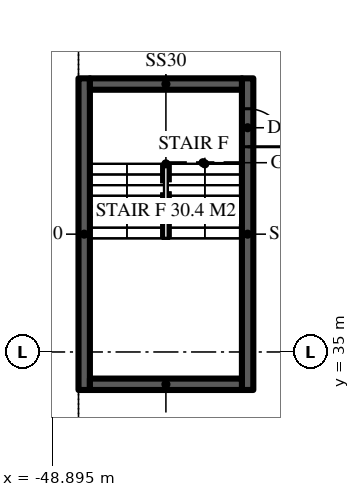
"""IFC4 building model, lengths in metres.
Left out: names, types, materials, properties, quantities, classifications, styles, units other than length and angle.
Written with IfcOpenShell. Run it as: python <this file> out.ifc"""

import sys

from ifc_helpers import new_model, si_unit, direction, frame, frame_2d, origin, place, context, subcontext, project, spatial, rectangle, extrude, element, fill, save


model = new_model("IFC4")
c1 = context("Model", 3, precision=1e-05, world=origin(), true_north=direction((0.0, 1.0)))
c2 = subcontext(c1, "Body", "Model", "MODEL_VIEW")
j1 = project(units=[si_unit("LENGTHUNIT", "METRE"), si_unit("PLANEANGLEUNIT", "RADIAN")], contexts=[c1])
p1 = place(None, origin())
s1 = spatial("IfcSite", under=j1, at=p1, CompositionType="ELEMENT")
p2 = place(p1, origin())
s2 = spatial("IfcBuilding", under=s1, at=p2, CompositionType="ELEMENT")
p3 = place(p2, frame((0.0, 0.0, -10.0)))
s3 = spatial("IfcBuildingStorey", under=s2, at=p3, CompositionType="ELEMENT", Elevation=-10.0)
p4 = place(p3, frame((-48.5, 48.2, -0.5), z_axis=(0.0, 0.0, 1.0), x_axis=(0.0, -1.0, 0.0)))
e1 = element("IfcWall", 1, at=p4, inside=s3, PredefinedType="SOLIDWALL", context=c2, shape_type="SweptSolid", body=[
    extrude(rectangle(XDim=96.4, YDim=0.6, at=frame_2d((48.2, 0.0))), origin(), (0.0, 0.0, 1.0), 10.1),
])
p5 = place(p2, frame((0.0, 0.0, -5.0)))
s4 = spatial("IfcBuildingStorey", under=s2, at=p5, CompositionType="ELEMENT", Elevation=-5.0)
p6 = place(p5, frame((-43.75, 42.2, 0.0), z_axis=(0.0, 0.0, 1.0), x_axis=(0.0, -1.0, 0.0)))
e2 = element("IfcWall", 2, at=p6, inside=s4, PredefinedType="SOLIDWALL", context=c2, shape_type="SweptSolid", body=[
    extrude(rectangle(XDim=8.2, YDim=0.3, at=frame_2d((4.1, 0.0))), origin(), (0.0, 0.0, 1.0), 4.6),
])
p7 = place(p6, frame((0.8, 0.0, 0.0)))
e3 = element("IfcOpeningElement", 3, at=p7, cuts=e2, PredefinedType="OPENING", context=c2, shape_type="SweptSolid", body=[
    extrude(rectangle(XDim=1.0, YDim=2.2, at=frame_2d((0.5, 1.1))), frame((0.0, 0.16, 0.0), z_axis=(0.0, -1.0, 0.0), x_axis=(1.0, 0.0, 0.0)), (0.0, 0.0, 1.0), 0.32),
])
p8 = place(p5, frame((-48.05, 34.0, 0.0), z_axis=(0.0, 0.0, 1.0), x_axis=(0.0, 1.0, 0.0)))
e4 = element("IfcWall", 4, at=p8, inside=s4, PredefinedType="SOLIDWALL", context=c2, shape_type="SweptSolid", body=[
    extrude(rectangle(XDim=8.2, YDim=0.3, at=frame_2d((4.1, 0.0))), origin(), (0.0, 0.0, 1.0), 4.6),
])
for number, where, z_axis, x_axis in (
    (5, (-43.9, 42.05, 0.0), (0.0, 0.0, 1.0), (-1.0, 0.0, 0.0)),
    (6, (-47.9, 34.15, 0.0), (0.0, 0.0, 1.0), (1.0, 0.0, 0.0)),
):
    element("IfcWall", number, at=place(p5, frame(where, z_axis=z_axis, x_axis=x_axis)), inside=s4, PredefinedType="SOLIDWALL", context=c2, shape_type="SweptSolid", body=[
        extrude(rectangle(XDim=4.0, YDim=0.3, at=frame_2d((2.0, 0.0))), origin(), (0.0, 0.0, 1.0), 4.6),
    ])
p9 = place(p7, origin())
e7 = element("IfcDoor", 7, at=p9, inside=s4, OperationType="SINGLE_SWING_RIGHT", PredefinedType="DOOR", context=c2, shape_type="SweptSolid", body=[
    extrude(rectangle(XDim=1.0, YDim=2.2, at=frame_2d((0.5, 1.1))), frame((0.0, 0.025, 0.0), z_axis=(0.0, -1.0, 0.0), x_axis=(1.0, 0.0, 0.0)), (0.0, 0.0, 1.0), 0.05),
])
fill(e3, e7)
save(model, sys.argv[1])
